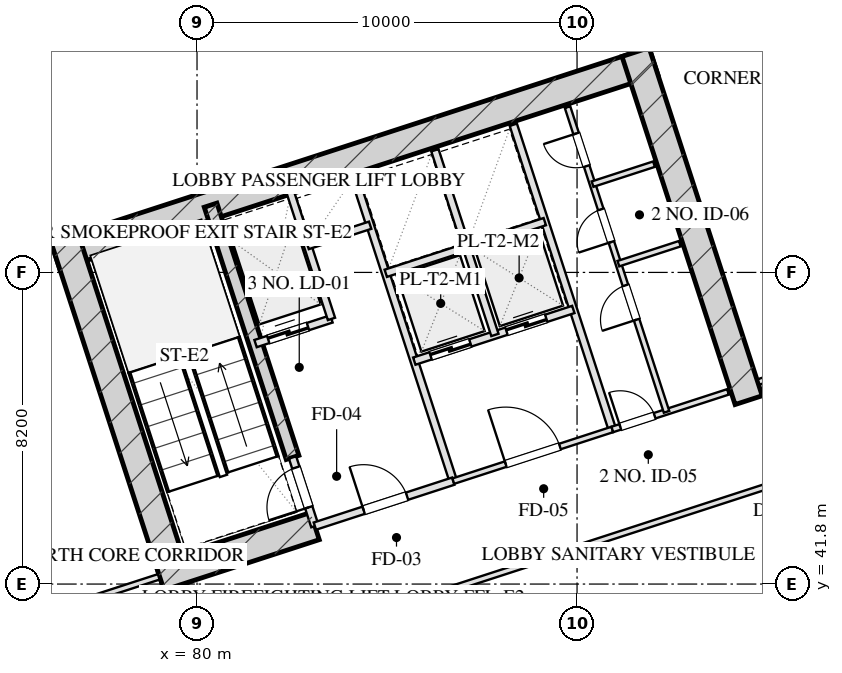
"""IFC4 building model, lengths in metres.
Left out: names, types, materials, properties, quantities, classifications, styles, units other than length and angle.
Written with IfcOpenShell. Run it as: python <this file> out.ifc"""

import sys

from ifc_helpers import new_model, si_unit, direction, frame, frame_2d, origin, place, context, subcontext, project, spatial, rectangle, extrude, element, fill, save


model = new_model("IFC4")
c1 = context("Model", 3, precision=1e-05, world=origin(), true_north=direction((0.0, 1.0)))
c2 = subcontext(c1, "Body", "Model", "MODEL_VIEW")
j1 = project(units=[si_unit("LENGTHUNIT", "METRE"), si_unit("PLANEANGLEUNIT", "RADIAN")], contexts=[c1])
p1 = place(None, origin())
s1 = spatial("IfcSite", under=j1, at=p1, CompositionType="ELEMENT")
p2 = place(p1, origin())
s2 = spatial("IfcBuilding", under=s1, at=p2, CompositionType="ELEMENT")
p3 = place(p2, frame((0.0, 0.0, 30.0)))
s3 = spatial("IfcBuildingStorey", under=s2, at=p3, CompositionType="ELEMENT", Elevation=30.0)
p4 = place(p3, frame((76.272, 50.443, 0.0), z_axis=(0.0, 0.0, 1.0), x_axis=(0.951056072937, 0.309018358888, 0.0)))
e1 = element("IfcWall", 1, at=p4, inside=s3, PredefinedType="SHEAR", context=c2, shape_type="SweptSolid", body=[
    extrude(rectangle(XDim=16.55, YDim=0.75, at=frame_2d((8.275, 0.0))), origin(), (0.0, 0.0, 1.0), 4.0),
])
for number, where, z_axis, x_axis in (
    (2, (79.489, 41.756, 0.0), (0.0, 0.0, 1.0), (-0.309, 0.951, 0.0)),
    (3, (94.515, 46.639, 0.0), (0.0, 0.0, 1.0), (-0.309, 0.951, 0.0)),
):
    element("IfcWall", number, at=place(p3, frame(where, z_axis=z_axis, x_axis=x_axis)), inside=s3, PredefinedType="SHEAR", context=c2, shape_type="SweptSolid", body=[
        extrude(rectangle(XDim=9.63, YDim=0.75, at=frame_2d((4.815, 0.0))), origin(), (0.0, 0.0, 1.0), 4.0),
    ])
p5 = place(p3, frame((82.514, 45.131, 0.0), z_axis=(0.0, 0.0, 1.0), x_axis=(-0.308988790936, 0.951065679686, 0.0)))
e4 = element("IfcWall", 4, at=p5, inside=s3, PredefinedType="SHEAR", context=c2, shape_type="SweptSolid", body=[
    extrude(rectangle(XDim=6.98, YDim=0.35, at=frame_2d((3.49, 0.0))), origin(), (0.0, 0.0, 1.0), 4.0),
])
p6 = place(p3, frame((79.016, 41.997, 0.0), z_axis=(0.0, 0.0, 1.0), x_axis=(0.95106038264, 0.309005094736, 0.0)))
e5 = element("IfcWall", 5, at=p6, inside=s3, PredefinedType="SHEAR", context=c2, shape_type="SweptSolid", body=[
    extrude(rectangle(XDim=4.295, YDim=0.75, at=frame_2d((2.147, 0.0))), origin(), (0.0, 0.0, 1.0), 4.0),
])
p7 = place(p3, frame((79.655, 4.352, 0.0), z_axis=(0.0, 0.0, 1.0), x_axis=(-0.309014526607, 0.951057318118, 0.0)))
e6 = element("IfcWall", 6, at=p7, inside=s3, PredefinedType="SOLIDWALL", context=c2, shape_type="SweptSolid", body=[
    extrude(rectangle(XDim=50.0, YDim=0.4, at=frame_2d((25.0, 0.0))), origin(), (0.0, 0.0, 1.0), 3.16),
])
p8 = place(p7, frame((17.35, 0.0, 0.75)))
e7 = element("IfcOpeningElement", 7, at=p8, cuts=e6, PredefinedType="OPENING", context=c2, shape_type="SweptSolid", body=[
    extrude(rectangle(XDim=2.5, YDim=1.75, at=frame_2d((1.25, 0.875))), frame((0.0, 0.21, 0.0), z_axis=(0.0, -1.0, 0.0), x_axis=(1.0, 0.0, 0.0)), (0.0, 0.0, 1.0), 0.42),
])
p9 = place(p7, frame((21.15, 0.0, 0.75)))
e8 = element("IfcOpeningElement", 8, at=p9, cuts=e6, PredefinedType="OPENING", context=c2, shape_type="SweptSolid", body=[
    extrude(rectangle(XDim=2.5, YDim=1.75, at=frame_2d((1.25, 0.875))), frame((0.0, 0.21, 0.0), z_axis=(0.0, -1.0, 0.0), x_axis=(1.0, 0.0, 0.0)), (0.0, 0.0, 1.0), 0.42),
])
p10 = place(p7, frame((26.35, 0.0, 0.75)))
e9 = element("IfcOpeningElement", 9, at=p10, cuts=e6, PredefinedType="OPENING", context=c2, shape_type="SweptSolid", body=[
    extrude(rectangle(XDim=2.5, YDim=1.75, at=frame_2d((1.25, 0.875))), frame((0.0, 0.21, 0.0), z_axis=(0.0, -1.0, 0.0), x_axis=(1.0, 0.0, 0.0)), (0.0, 0.0, 1.0), 0.42),
])
p11 = place(p7, frame((30.15, 0.0, 0.75)))
e10 = element("IfcOpeningElement", 10, at=p11, cuts=e6, PredefinedType="OPENING", context=c2, shape_type="SweptSolid", body=[
    extrude(rectangle(XDim=2.5, YDim=1.75, at=frame_2d((1.25, 0.875))), frame((0.0, 0.21, 0.0), z_axis=(0.0, -1.0, 0.0), x_axis=(1.0, 0.0, 0.0)), (0.0, 0.0, 1.0), 0.42),
])
p12 = place(p3, frame((66.002, 55.433, 0.0), z_axis=(0.0, 0.0, 1.0), x_axis=(0.951055939317, 0.309018770125, 0.0)))
e11 = element("IfcWall", 11, at=p12, inside=s3, PredefinedType="SOLIDWALL", context=c2, shape_type="SweptSolid", body=[
    extrude(rectangle(XDim=32.4, YDim=0.4, at=frame_2d((16.2, 0.0))), origin(), (0.0, 0.0, 1.0), 3.16),
])
p13 = place(p3, frame((83.101, 43.324, 0.0), z_axis=(0.0, 0.0, 1.0), x_axis=(-0.309048298632, 0.951046344356, 0.0)))
e12 = element("IfcWall", 12, at=p13, inside=s3, PredefinedType="PARTITIONING", context=c2, shape_type="SweptSolid", body=[
    extrude(rectangle(XDim=1.9, YDim=0.2, at=frame_2d((0.95, 0.0))), origin(), (0.0, 0.0, 1.0), 3.725),
])
p14 = place(p13, frame((0.52, 0.0, 0.0)))
e13 = element("IfcOpeningElement", 13, at=p14, cuts=e12, PredefinedType="OPENING", context=c2, shape_type="SweptSolid", body=[
    extrude(rectangle(XDim=1.1, YDim=2.05, at=frame_2d((0.55, 1.025))), frame((0.0, 0.11, 0.0), z_axis=(0.0, -1.0, 0.0), x_axis=(1.0, 0.0, 0.0)), (0.0, 0.0, 1.0), 0.22),
])
p15 = place(p3, frame((86.743, 44.508, 0.0), z_axis=(0.0, 0.0, 1.0), x_axis=(-0.309016001439, 0.951056838919, 0.0)))
e14 = element("IfcWall", 14, at=p15, inside=s3, PredefinedType="PARTITIONING", context=c2, shape_type="SweptSolid", body=[
    extrude(rectangle(XDim=8.43, YDim=0.2, at=frame_2d((4.215, 0.0))), origin(), (0.0, 0.0, 1.0), 3.725),
])
p16 = place(p3, frame((83.101, 43.324, 0.0), z_axis=(0.0, 0.0, 1.0), x_axis=(0.951052804469, 0.309028417967, 0.0)))
e15 = element("IfcWall", 15, at=p16, inside=s3, PredefinedType="PARTITIONING", context=c2, shape_type="SweptSolid", body=[
    extrude(rectangle(XDim=3.83, YDim=0.2, at=frame_2d((1.915, 0.0))), origin(), (0.0, 0.0, 1.0), 3.725),
])
p17 = place(p16, frame((1.35, 0.0, 0.0)))
e16 = element("IfcOpeningElement", 16, at=p17, cuts=e15, PredefinedType="OPENING", context=c2, shape_type="SweptSolid", body=[
    extrude(rectangle(XDim=1.2, YDim=2.05, at=frame_2d((0.6, 1.025))), frame((0.0, 0.11, 0.0), z_axis=(0.0, -1.0, 0.0), x_axis=(1.0, 0.0, 0.0)), (0.0, 0.0, 1.0), 0.22),
])
p18 = place(p3, frame((81.54, 48.127, 0.0), z_axis=(0.0, 0.0, 1.0), x_axis=(0.951062257173, 0.308999325213, 0.0)))
e17 = element("IfcWall", 17, at=p18, inside=s3, PredefinedType="PARTITIONING", context=c2, shape_type="SweptSolid", body=[
    extrude(rectangle(XDim=2.1, YDim=0.2, at=frame_2d((1.05, 0.0))), origin(), (0.0, 0.0, 1.0), 3.725),
])
p19 = place(p18, frame((0.35, 0.0, 0.0)))
e18 = element("IfcOpeningElement", 18, at=p19, cuts=e17, PredefinedType="OPENING", context=c2, shape_type="SweptSolid", body=[
    extrude(rectangle(XDim=1.1, YDim=2.05, at=frame_2d((0.55, 1.025))), frame((0.0, 0.11, 0.0), z_axis=(0.0, -1.0, 0.0), x_axis=(1.0, 0.0, 0.0)), (0.0, 0.0, 1.0), 0.22),
])
p20 = place(p3, frame((83.538, 48.776, 0.0), z_axis=(0.0, 0.0, 1.0), x_axis=(-0.3089935693, 0.951064127245, 0.0)))
e19 = element("IfcWall", 19, at=p20, inside=s3, PredefinedType="PARTITIONING", context=c2, shape_type="SweptSolid", body=[
    extrude(rectangle(XDim=3.7, YDim=0.2, at=frame_2d((1.85, 0.0))), origin(), (0.0, 0.0, 1.0), 3.725),
])
p21 = place(p3, frame((82.91, 50.707, 0.0), z_axis=(0.0, 0.0, 1.0), x_axis=(0.951041328149, 0.309063734775, 0.0)))
e20 = element("IfcWall", 20, at=p21, inside=s3, PredefinedType="PARTITIONING", context=c2, shape_type="SweptSolid", body=[
    extrude(rectangle(XDim=1.73, YDim=0.2, at=frame_2d((0.865, 0.0))), origin(), (0.0, 0.0, 1.0), 3.725),
])
p22 = place(p3, frame((90.928, 45.868, 0.0), z_axis=(0.0, 0.0, 1.0), x_axis=(-0.309042196757, 0.951048327176, 0.0)))
e21 = element("IfcWall", 21, at=p22, inside=s3, PredefinedType="PARTITIONING", context=c2, shape_type="SweptSolid", body=[
    extrude(rectangle(XDim=8.43, YDim=0.2, at=frame_2d((4.215, 0.0))), origin(), (0.0, 0.0, 1.0), 3.725),
])
p23 = place(p3, frame((86.743, 44.508, 0.0), z_axis=(0.0, 0.0, 1.0), x_axis=(0.951063829732, 0.308994485023, 0.0)))
e22 = element("IfcWall", 22, at=p23, inside=s3, PredefinedType="PARTITIONING", context=c2, shape_type="SweptSolid", body=[
    extrude(rectangle(XDim=4.4, YDim=0.15, at=frame_2d((2.2, 0.0))), origin(), (0.0, 0.0, 1.0), 3.725),
])
p24 = place(p23, frame((1.45, 0.0, 0.0)))
e23 = element("IfcOpeningElement", 23, at=p24, cuts=e22, PredefinedType="OPENING", context=c2, shape_type="SweptSolid", body=[
    extrude(rectangle(XDim=1.5, YDim=2.05, at=frame_2d((0.75, 1.025))), frame((0.0, 0.085, 0.0), z_axis=(0.0, -1.0, 0.0), x_axis=(1.0, 0.0, 0.0)), (0.0, 0.0, 1.0), 0.17),
])
p25 = place(p3, frame((85.718, 47.666, 0.0), z_axis=(0.0, 0.0, 1.0), x_axis=(0.951058531764, 0.30901079133, 0.0)))
e24 = element("IfcWall", 24, at=p25, inside=s3, PredefinedType="PARTITIONING", context=c2, shape_type="SweptSolid", body=[
    extrude(rectangle(XDim=4.4, YDim=0.2, at=frame_2d((2.2, 0.0))), origin(), (0.0, 0.0, 1.0), 3.725),
])
p26 = place(p25, frame((0.45, 0.0, 0.0)))
e25 = element("IfcOpeningElement", 25, at=p26, cuts=e24, PredefinedType="OPENING", context=c2, shape_type="SweptSolid", body=[
    extrude(rectangle(XDim=1.1, YDim=2.05, at=frame_2d((0.55, 1.025))), frame((0.0, 0.11, 0.0), z_axis=(0.0, -1.0, 0.0), x_axis=(1.0, 0.0, 0.0)), (0.0, 0.0, 1.0), 0.22),
])
p27 = place(p25, frame((2.55, 0.0, 0.0)))
e26 = element("IfcOpeningElement", 26, at=p27, cuts=e24, PredefinedType="OPENING", context=c2, shape_type="SweptSolid", body=[
    extrude(rectangle(XDim=1.1, YDim=2.05, at=frame_2d((0.55, 1.025))), frame((0.0, 0.11, 0.0), z_axis=(0.0, -1.0, 0.0), x_axis=(1.0, 0.0, 0.0)), (0.0, 0.0, 1.0), 0.22),
])
p28 = place(p3, frame((87.838, 48.354, 0.0), z_axis=(0.0, 0.0, 1.0), x_axis=(-0.3090093719, 0.951058992953, 0.0)))
e27 = element("IfcWall", 27, at=p28, inside=s3, PredefinedType="PARTITIONING", context=c2, shape_type="SweptSolid", body=[
    extrude(rectangle(XDim=5.11, YDim=0.2, at=frame_2d((2.555, 0.0))), origin(), (0.0, 0.0, 1.0), 3.725),
])
p29 = place(p3, frame((84.967, 49.977, 0.0), z_axis=(0.0, 0.0, 1.0), x_axis=(0.951063829732, 0.308994485023, 0.0)))
e28 = element("IfcWall", 28, at=p29, inside=s3, PredefinedType="PARTITIONING", context=c2, shape_type="SweptSolid", body=[
    extrude(rectangle(XDim=4.4, YDim=0.2, at=frame_2d((2.2, 0.0))), origin(), (0.0, 0.0, 1.0), 3.725),
])
p30 = place(p3, frame((90.928, 45.868, 0.0), z_axis=(0.0, 0.0, 1.0), x_axis=(0.951059297078, 0.309008435874, 0.0)))
e29 = element("IfcWall", 29, at=p30, inside=s3, PredefinedType="PARTITIONING", context=c2, shape_type="SweptSolid", body=[
    extrude(rectangle(XDim=3.2, YDim=0.15, at=frame_2d((1.6, 0.0))), origin(), (0.0, 0.0, 1.0), 3.725),
])
p31 = place(p30, frame((0.22, 0.0, 0.0)))
e30 = element("IfcOpeningElement", 30, at=p31, cuts=e29, PredefinedType="OPENING", context=c2, shape_type="SweptSolid", body=[
    extrude(rectangle(XDim=0.95, YDim=2.05, at=frame_2d((0.475, 1.025))), frame((0.0, 0.085, 0.0), z_axis=(0.0, -1.0, 0.0), x_axis=(1.0, 0.0, 0.0)), (0.0, 0.0, 1.0), 0.17),
])
p32 = place(p3, frame((92.355, 46.331, 0.0), z_axis=(0.0, 0.0, 1.0), x_axis=(-0.309007490203, 0.951059604335, 0.0)))
e31 = element("IfcWall", 31, at=p32, inside=s3, PredefinedType="PARTITIONING", context=c2, shape_type="SweptSolid", body=[
    extrude(rectangle(XDim=8.43, YDim=0.15, at=frame_2d((4.215, 0.0))), origin(), (0.0, 0.0, 1.0), 3.725),
])
p33 = place(p32, frame((2.55, 0.0, 0.0)))
e32 = element("IfcOpeningElement", 32, at=p33, cuts=e31, PredefinedType="OPENING", context=c2, shape_type="SweptSolid", body=[
    extrude(rectangle(XDim=0.95, YDim=2.05, at=frame_2d((0.475, 1.025))), frame((0.0, 0.085, 0.0), z_axis=(0.0, -1.0, 0.0), x_axis=(1.0, 0.0, 0.0)), (0.0, 0.0, 1.0), 0.17),
])
p34 = place(p32, frame((4.7, 0.0, 0.0)))
e33 = element("IfcOpeningElement", 33, at=p34, cuts=e31, PredefinedType="OPENING", context=c2, shape_type="SweptSolid", body=[
    extrude(rectangle(XDim=0.9, YDim=2.05, at=frame_2d((0.45, 1.025))), frame((0.0, 0.085, 0.0), z_axis=(0.0, -1.0, 0.0), x_axis=(1.0, 0.0, 0.0)), (0.0, 0.0, 1.0), 0.17),
])
p35 = place(p32, frame((6.8, 0.0, 0.0)))
e34 = element("IfcOpeningElement", 34, at=p35, cuts=e31, PredefinedType="OPENING", context=c2, shape_type="SweptSolid", body=[
    extrude(rectangle(XDim=0.9, YDim=2.05, at=frame_2d((0.45, 1.025))), frame((0.0, 0.085, 0.0), z_axis=(0.0, -1.0, 0.0), x_axis=(1.0, 0.0, 0.0)), (0.0, 0.0, 1.0), 0.17),
])
p36 = place(p3, frame((91.088, 50.23, 0.0), z_axis=(0.0, 0.0, 1.0), x_axis=(0.951054116971, 0.309024378638, 0.0)))
e35 = element("IfcWall", 35, at=p36, inside=s3, PredefinedType="PARTITIONING", context=c2, shape_type="SweptSolid", body=[
    extrude(rectangle(XDim=1.7, YDim=0.15, at=frame_2d((0.85, 0.0))), origin(), (0.0, 0.0, 1.0), 3.725),
])
p37 = place(p3, frame((90.408, 52.323, 0.0), z_axis=(0.0, 0.0, 1.0), x_axis=(0.951040401051, 0.309066587596, 0.0)))
e36 = element("IfcWall", 36, at=p37, inside=s3, PredefinedType="PARTITIONING", context=c2, shape_type="SweptSolid", body=[
    extrude(rectangle(XDim=1.7, YDim=0.15, at=frame_2d((0.85, 0.0))), origin(), (0.0, 0.0, 1.0), 3.725),
])
p38 = place(p3, frame((68.721, 38.652, 0.0), z_axis=(0.0, 0.0, 1.0), x_axis=(0.951056658866, 0.309016555588, 0.0)))
e37 = element("IfcWall", 37, at=p38, inside=s3, PredefinedType="PARTITIONING", context=c2, shape_type="SweptSolid", body=[
    extrude(rectangle(XDim=10.8, YDim=0.15, at=frame_2d((5.4, 0.0))), origin(), (0.0, 0.0, 1.0), 3.725),
])
p39 = place(p38, frame((4.536, 0.0, 0.0)))
e38 = element("IfcOpeningElement", 38, at=p39, cuts=e37, PredefinedType="OPENING", context=c2, shape_type="SweptSolid", body=[
    extrude(rectangle(XDim=1.0, YDim=2.05, at=frame_2d((0.5, 1.025))), frame((0.0, 0.085, 0.0), z_axis=(0.0, -1.0, 0.0), x_axis=(1.0, 0.0, 0.0)), (0.0, 0.0, 1.0), 0.17),
])
p40 = place(p3, frame((94.78, 47.119, 0.0), z_axis=(0.0, 0.0, 1.0), x_axis=(0.951054294345, 0.309023832749, 0.0)))
e39 = element("IfcWall", 39, at=p40, inside=s3, PredefinedType="PARTITIONING", context=c2, shape_type="SweptSolid", body=[
    extrude(rectangle(XDim=10.2, YDim=0.15, at=frame_2d((5.1, 0.0))), origin(), (0.0, 0.0, 1.0), 3.725),
])
p41 = place(p40, frame((4.284, 0.0, 0.0)))
e40 = element("IfcOpeningElement", 40, at=p41, cuts=e39, PredefinedType="OPENING", context=c2, shape_type="SweptSolid", body=[
    extrude(rectangle(XDim=1.0, YDim=2.05, at=frame_2d((0.5, 1.025))), frame((0.0, 0.085, 0.0), z_axis=(0.0, -1.0, 0.0), x_axis=(1.0, 0.0, 0.0)), (0.0, 0.0, 1.0), 0.17),
])
p42 = place(p3, frame((86.692, 41.673, 0.0), z_axis=(0.0, 0.0, 1.0), x_axis=(0.951055605195, 0.309019798438, 0.0)))
e41 = element("IfcWall", 41, at=p42, inside=s3, PredefinedType="PARTITIONING", context=c2, shape_type="SweptSolid", body=[
    extrude(rectangle(XDim=19.575, YDim=0.15, at=frame_2d((9.788, 0.0))), origin(), (0.0, 0.0, 1.0), 3.725),
])
p43 = place(p3, frame((91.834, 25.848, 0.0), z_axis=(0.0, 0.0, 1.0), x_axis=(-0.30901773025, 0.951056277195, 0.0)))
e42 = element("IfcWall", 42, at=p43, inside=s3, PredefinedType="PARTITIONING", context=c2, shape_type="SweptSolid", body=[
    extrude(rectangle(XDim=16.64, YDim=0.15, at=frame_2d((8.32, 0.0))), origin(), (0.0, 0.0, 1.0), 3.725),
])
p44 = place(p43, frame((1.663, 0.0, 0.0)))
e43 = element("IfcOpeningElement", 43, at=p44, cuts=e42, PredefinedType="OPENING", context=c2, shape_type="SweptSolid", body=[
    extrude(rectangle(XDim=1.0, YDim=2.05, at=frame_2d((0.5, 1.025))), frame((0.0, 0.085, 0.0), z_axis=(0.0, -1.0, 0.0), x_axis=(1.0, 0.0, 0.0)), (0.0, 0.0, 1.0), 0.17),
])
p45 = place(p43, frame((6.156, 0.0, 0.0)))
e44 = element("IfcOpeningElement", 44, at=p45, cuts=e42, PredefinedType="OPENING", context=c2, shape_type="SweptSolid", body=[
    extrude(rectangle(XDim=1.0, YDim=2.05, at=frame_2d((0.5, 1.025))), frame((0.0, 0.085, 0.0), z_axis=(0.0, -1.0, 0.0), x_axis=(1.0, 0.0, 0.0)), (0.0, 0.0, 1.0), 0.17),
])
p46 = place(p43, frame((10.649, 0.0, 0.0)))
e45 = element("IfcOpeningElement", 45, at=p46, cuts=e42, PredefinedType="OPENING", context=c2, shape_type="SweptSolid", body=[
    extrude(rectangle(XDim=1.0, YDim=2.05, at=frame_2d((0.5, 1.025))), frame((0.0, 0.085, 0.0), z_axis=(0.0, -1.0, 0.0), x_axis=(1.0, 0.0, 0.0)), (0.0, 0.0, 1.0), 0.17),
])
p47 = place(p43, frame((14.476, 0.0, 0.0)))
e46 = element("IfcOpeningElement", 46, at=p47, cuts=e42, PredefinedType="OPENING", context=c2, shape_type="SweptSolid", body=[
    extrude(rectangle(XDim=1.0, YDim=2.05, at=frame_2d((0.5, 1.025))), frame((0.0, 0.085, 0.0), z_axis=(0.0, -1.0, 0.0), x_axis=(1.0, 0.0, 0.0)), (0.0, 0.0, 1.0), 0.17),
])
p48 = place(p3, frame((87.72, 38.508, 0.0), z_axis=(0.0, 0.0, 1.0), x_axis=(0.951059270613, 0.309008517326, 0.0)))
e47 = element("IfcWall", 47, at=p48, inside=s3, PredefinedType="PARTITIONING", context=c2, shape_type="SweptSolid", body=[
    extrude(rectangle(XDim=19.575, YDim=0.15, at=frame_2d((9.788, 0.0))), origin(), (0.0, 0.0, 1.0), 3.725),
])
p49 = place(p14, origin())
e48 = element("IfcDoor", 48, at=p49, inside=s3, OperationType="SINGLE_SWING_LEFT", PredefinedType="DOOR", context=c2, shape_type="SweptSolid", body=[
    extrude(rectangle(XDim=1.1, YDim=2.05, at=frame_2d((0.55, 1.025))), frame((0.0, 0.025, 0.0), z_axis=(0.0, -1.0, 0.0), x_axis=(1.0, 0.0, 0.0)), (0.0, 0.0, 1.0), 0.05),
])
fill(e13, e48)
p50 = place(p17, origin())
e49 = element("IfcDoor", 49, at=p50, inside=s3, OperationType="SINGLE_SWING_LEFT", PredefinedType="DOOR", context=c2, shape_type="SweptSolid", body=[
    extrude(rectangle(XDim=1.2, YDim=2.05, at=frame_2d((0.6, 1.025))), frame((0.0, 0.025, 0.0), z_axis=(0.0, -1.0, 0.0), x_axis=(1.0, 0.0, 0.0)), (0.0, 0.0, 1.0), 0.05),
])
fill(e16, e49)
p51 = place(p19, origin())
e50 = element("IfcDoor", 50, at=p51, inside=s3, OperationType="DOUBLE_DOOR_SLIDING", PredefinedType="DOOR", context=c2, shape_type="SweptSolid", body=[
    extrude(rectangle(XDim=1.1, YDim=2.05, at=frame_2d((0.55, 1.025))), frame((0.0, 0.025, 0.0), z_axis=(0.0, -1.0, 0.0), x_axis=(1.0, 0.0, 0.0)), (0.0, 0.0, 1.0), 0.05),
])
fill(e18, e50)
p52 = place(p24, origin())
e51 = element("IfcDoor", 51, at=p52, inside=s3, OperationType="SINGLE_SWING_LEFT", PredefinedType="DOOR", context=c2, shape_type="SweptSolid", body=[
    extrude(rectangle(XDim=1.5, YDim=2.05, at=frame_2d((0.75, 1.025))), frame((0.0, 0.025, 0.0), z_axis=(0.0, -1.0, 0.0), x_axis=(1.0, 0.0, 0.0)), (0.0, 0.0, 1.0), 0.05),
])
fill(e23, e51)
p53 = place(p26, origin())
e52 = element("IfcDoor", 52, at=p53, inside=s3, OperationType="DOUBLE_DOOR_SLIDING", PredefinedType="DOOR", context=c2, shape_type="SweptSolid", body=[
    extrude(rectangle(XDim=1.1, YDim=2.05, at=frame_2d((0.55, 1.025))), frame((0.0, 0.025, 0.0), z_axis=(0.0, -1.0, 0.0), x_axis=(1.0, 0.0, 0.0)), (0.0, 0.0, 1.0), 0.05),
])
fill(e25, e52)
p54 = place(p27, origin())
e53 = element("IfcDoor", 53, at=p54, inside=s3, OperationType="DOUBLE_DOOR_SLIDING", PredefinedType="DOOR", context=c2, shape_type="SweptSolid", body=[
    extrude(rectangle(XDim=1.1, YDim=2.05, at=frame_2d((0.55, 1.025))), frame((0.0, 0.025, 0.0), z_axis=(0.0, -1.0, 0.0), x_axis=(1.0, 0.0, 0.0)), (0.0, 0.0, 1.0), 0.05),
])
fill(e26, e53)
p55 = place(p31, origin())
e54 = element("IfcDoor", 54, at=p55, inside=s3, OperationType="SINGLE_SWING_LEFT", PredefinedType="DOOR", context=c2, shape_type="SweptSolid", body=[
    extrude(rectangle(XDim=0.95, YDim=2.05, at=frame_2d((0.475, 1.025))), frame((0.0, 0.025, 0.0), z_axis=(0.0, -1.0, 0.0), x_axis=(1.0, 0.0, 0.0)), (0.0, 0.0, 1.0), 0.05),
])
fill(e30, e54)
p56 = place(p33, origin())
e55 = element("IfcDoor", 55, at=p56, inside=s3, OperationType="SINGLE_SWING_LEFT", PredefinedType="DOOR", context=c2, shape_type="SweptSolid", body=[
    extrude(rectangle(XDim=0.95, YDim=2.05, at=frame_2d((0.475, 1.025))), frame((0.0, 0.025, 0.0), z_axis=(0.0, -1.0, 0.0), x_axis=(1.0, 0.0, 0.0)), (0.0, 0.0, 1.0), 0.05),
])
fill(e32, e55)
p57 = place(p34, origin())
e56 = element("IfcDoor", 56, at=p57, inside=s3, OperationType="SINGLE_SWING_LEFT", PredefinedType="DOOR", context=c2, shape_type="SweptSolid", body=[
    extrude(rectangle(XDim=0.9, YDim=2.05, at=frame_2d((0.45, 1.025))), frame((0.0, 0.025, 0.0), z_axis=(0.0, -1.0, 0.0), x_axis=(1.0, 0.0, 0.0)), (0.0, 0.0, 1.0), 0.05),
])
fill(e33, e56)
p58 = place(p35, origin())
e57 = element("IfcDoor", 57, at=p58, inside=s3, OperationType="SINGLE_SWING_RIGHT", PredefinedType="DOOR", context=c2, shape_type="SweptSolid", body=[
    extrude(rectangle(XDim=0.9, YDim=2.05, at=frame_2d((0.45, 1.025))), frame((0.0, 0.025, 0.0), z_axis=(0.0, -1.0, 0.0), x_axis=(1.0, 0.0, 0.0)), (0.0, 0.0, 1.0), 0.05),
])
fill(e34, e57)
save(model, sys.argv[1])
